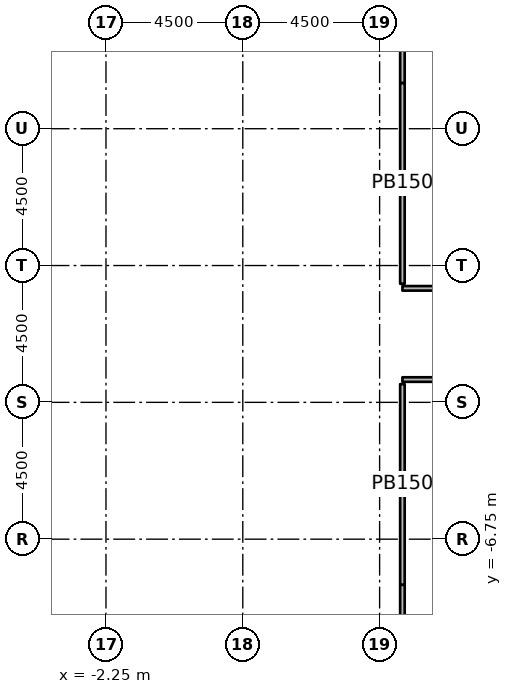
"""IFC4 building model, lengths in metres.
Left out: names, types, materials, properties, quantities, classifications, styles, units other than length and angle.
Written with IfcOpenShell. Run it as: python <this file> out.ifc"""

import sys

from ifc_helpers import new_model, si_unit, direction, frame, frame_2d, origin, origin_2d, place, context, subcontext, project, spatial, rectangle, extrude, element, save


model = new_model("IFC4")
c1 = context("Model", 3, precision=1e-05, world=origin(), true_north=direction((0.0, 1.0)))
c2 = subcontext(c1, "Body", "Model", "MODEL_VIEW")
j1 = project(units=[si_unit("LENGTHUNIT", "METRE"), si_unit("PLANEANGLEUNIT", "RADIAN")], contexts=[c1])
p1 = place(None, origin())
s1 = spatial("IfcSite", under=j1, at=p1, CompositionType="ELEMENT")
p2 = place(p1, origin())
s2 = spatial("IfcBuilding", under=s1, at=p2, CompositionType="ELEMENT")
p3 = place(p2, frame((0.0, 0.0, 12.0)))
s3 = spatial("IfcBuildingStorey", under=s2, at=p3, CompositionType="ELEMENT", Elevation=12.0)
for number, where, z_axis, x_axis in (
    (1, (6.25, -6.25, 0.0), (0.0, 0.0, 1.0), (1.0, 0.0, 0.0)),
    (2, (6.25, 6.25, 0.0), (0.0, 0.0, 1.0), (1.0, 0.0, 0.0)),
):
    element("IfcColumn", number, at=place(p3, frame(where, z_axis=z_axis, x_axis=x_axis)), inside=s3, PredefinedType="COLUMN", context=c2, shape_type="SweptSolid", body=[
        extrude(rectangle(XDim=1.2, YDim=1.2, at=origin_2d()), origin(), (0.0, 0.0, 1.0), 4.55),
    ])
p4 = place(p3, frame((7.5, 24.75, 0.0), z_axis=(0.0, 0.0, 1.0), x_axis=(0.0, -1.0, 0.0)))
e3 = element("IfcWall", 3, at=p4, inside=s3, PredefinedType="PARTITIONING", context=c2, shape_type="SweptSolid", body=[
    extrude(rectangle(XDim=16.5, YDim=0.15, at=frame_2d((8.25, 0.0))), origin(), (0.0, 0.0, 1.0), 4.55),
])
p5 = place(p4, frame((10.5, 0.0, 0.0)))
e4 = element("IfcOpeningElement", 4, at=p5, cuts=e3, PredefinedType="OPENING", context=c2, shape_type="SweptSolid", body=[
    extrude(rectangle(XDim=1.0, YDim=2.1, at=frame_2d((0.5, 1.05))), frame((0.0, 0.085, 0.0), z_axis=(0.0, -1.0, 0.0), x_axis=(1.0, 0.0, 0.0)), (0.0, 0.0, 1.0), 0.17),
])
p6 = place(p3, frame((7.5, -8.25, 0.0), z_axis=(0.0, 0.0, 1.0), x_axis=(0.0, -1.0, 0.0)))
e5 = element("IfcWall", 5, at=p6, inside=s3, PredefinedType="PARTITIONING", context=c2, shape_type="SweptSolid", body=[
    extrude(rectangle(XDim=16.5, YDim=0.15, at=frame_2d((8.25, 0.0))), origin(), (0.0, 0.0, 1.0), 4.55),
])
p7 = place(p3, frame((7.5, 1.5, 0.0), z_axis=(0.0, 0.0, 1.0), x_axis=(1.0, 0.0, 0.0)))
e6 = element("IfcWall", 6, at=p7, inside=s3, PredefinedType="PARTITIONING", context=c2, shape_type="SweptSolid", body=[
    extrude(rectangle(XDim=17.25, YDim=0.15, at=frame_2d((8.625, 0.0))), origin(), (0.0, 0.0, 1.0), 4.55),
])
p8 = place(p7, frame((5.25, 0.0, 0.0)))
e7 = element("IfcOpeningElement", 7, at=p8, cuts=e6, PredefinedType="OPENING", context=c2, shape_type="SweptSolid", body=[
    extrude(rectangle(XDim=1.0, YDim=2.1, at=frame_2d((0.5, 1.05))), frame((0.0, 0.085, 0.0), z_axis=(0.0, -1.0, 0.0), x_axis=(1.0, 0.0, 0.0)), (0.0, 0.0, 1.0), 0.17),
])
p9 = place(p3, frame((29.25, -1.5, 0.0), z_axis=(0.0, 0.0, 1.0), x_axis=(-1.0, 0.0, 0.0)))
e8 = element("IfcWall", 8, at=p9, inside=s3, PredefinedType="PARTITIONING", context=c2, shape_type="SweptSolid", body=[
    extrude(rectangle(XDim=21.75, YDim=0.15, at=frame_2d((10.875, 0.0))), origin(), (0.0, 0.0, 1.0), 4.55),
])
p10 = place(p9, frame((10.425, 0.0, 0.0)))
e9 = element("IfcOpeningElement", 9, at=p10, cuts=e8, PredefinedType="OPENING", context=c2, shape_type="SweptSolid", body=[
    extrude(rectangle(XDim=0.9, YDim=2.1, at=frame_2d((0.45, 1.05))), frame((0.0, 0.085, 0.0), z_axis=(0.0, -1.0, 0.0), x_axis=(1.0, 0.0, 0.0)), (0.0, 0.0, 1.0), 0.17),
])
for number, where, z_axis, x_axis in (
    (10, (7.5, 1.65, 0.0), (0.0, 0.0, 1.0), (0.0, 1.0, 0.0)),
    (11, (7.5, -8.25, 0.0), (0.0, 0.0, 1.0), (0.0, 1.0, 0.0)),
):
    element("IfcWall", number, at=place(p3, frame(where, z_axis=z_axis, x_axis=x_axis)), inside=s3, PredefinedType="PARTITIONING", context=c2, shape_type="SweptSolid", body=[
        extrude(rectangle(XDim=6.6, YDim=0.15, at=frame_2d((3.3, 0.0))), origin(), (0.0, 0.0, 1.0), 4.55),
    ])
save(model, sys.argv[1])
